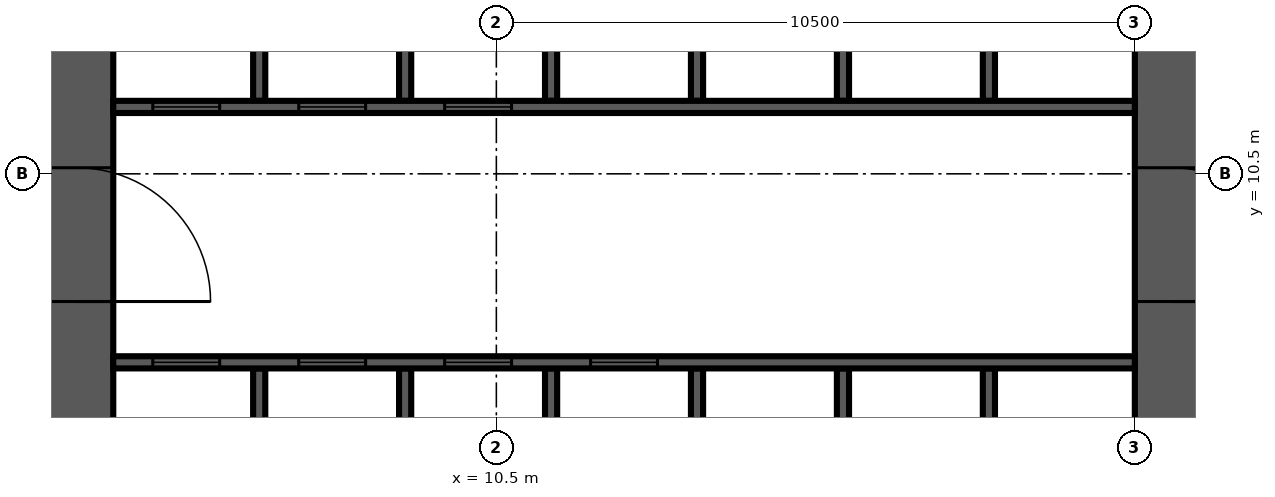
"""IFC4 building model, lengths in metres.
Left out: names, types, materials, properties, quantities, classifications, styles, units other than length and angle.
Written with IfcOpenShell. Run it as: python <this file> out.ifc"""

import sys

from ifc_helpers import new_model, si_unit, direction, frame, frame_2d, origin, place, context, subcontext, project, spatial, rectangle, extrude, source, transform, mapped, element, fill, save


model = new_model("IFC4")
c1 = context("Model", 3, precision=1e-05, world=origin(), true_north=direction((0.0, 1.0)))
c2 = subcontext(c1, "Body", "Model", "MODEL_VIEW")
j1 = project(units=[si_unit("LENGTHUNIT", "METRE"), si_unit("PLANEANGLEUNIT", "RADIAN")], contexts=[c1])
p1 = place(None, origin())
s1 = spatial("IfcSite", under=j1, at=p1, CompositionType="ELEMENT")
p2 = place(p1, origin())
s2 = spatial("IfcBuilding", under=s1, at=p2, CompositionType="ELEMENT")
p3 = place(p2, frame((0.0, 0.0, 90.9)))
s3 = spatial("IfcBuildingStorey", under=s2, at=p3, CompositionType="ELEMENT", Elevation=90.9)
m1 = source(origin(), c2, "Body", "SweptSolid", [
    extrude(rectangle(XDim=18.0, YDim=1.2, at=frame_2d((9.0, 0.0))), origin(), (0.0, 0.0, 1.0), 4.2),
])
p4 = place(p3, frame((3.6, 4.2, 0.0), z_axis=(0.0, 0.0, 1.0), x_axis=(0.0, 1.0, 0.0)))
e1 = element("IfcWall", 1, at=p4, inside=s3, PredefinedType="SHEAR", context=c2, shape_type="MappedRepresentation", body=[
    mapped(m1, transform((0.0, 0.0, 0.0), scale=1.0)),
])
m2 = source(origin(), c2, "Body", "SweptSolid", [
    extrude(rectangle(XDim=2.2, YDim=2.1, at=frame_2d((1.1, 1.05))), frame((0.0, 0.61, 0.0), z_axis=(0.0, -1.0, 0.0), x_axis=(1.0, 0.0, 0.0)), (0.0, 0.0, 1.0), 1.22),
])
p5 = place(p4, frame((4.2, 0.0, 0.0)))
e2 = element("IfcOpeningElement", 2, at=p5, cuts=e1, PredefinedType="OPENING", context=c2, shape_type="MappedRepresentation", body=[
    mapped(m2, transform((0.0, 0.0, 0.0), scale=1.0)),
])
m3 = source(origin(), c2, "Body", "SweptSolid", [
    extrude(rectangle(XDim=16.8, YDim=1.2, at=frame_2d((8.4, 0.0))), origin(), (0.0, 0.0, 1.0), 4.2),
])
p6 = place(p3, frame((21.6, 4.2, 0.0), z_axis=(0.0, 0.0, 1.0), x_axis=(0.0, 1.0, 0.0)))
e3 = element("IfcWall", 3, at=p6, inside=s3, PredefinedType="SHEAR", context=c2, shape_type="MappedRepresentation", body=[
    mapped(m3, transform((0.0, 0.0, 0.0), scale=1.0)),
])
p7 = place(p6, frame((4.2, 0.0, 0.0)))
e4 = element("IfcOpeningElement", 4, at=p7, cuts=e3, PredefinedType="OPENING", context=c2, shape_type="MappedRepresentation", body=[
    mapped(m2, transform((0.0, 0.0, 0.0), scale=1.0)),
])
m4 = source(origin(), c2, "Body", "SweptSolid", [
    extrude(rectangle(XDim=1.2, YDim=2.1, at=frame_2d((0.6, 1.05))), frame((0.0, 0.61, 0.0), z_axis=(0.0, -1.0, 0.0), x_axis=(1.0, 0.0, 0.0)), (0.0, 0.0, 1.0), 1.22),
])
p8 = place(p6, frame((14.7, 0.0, 0.0)))
e5 = element("IfcOpeningElement", 5, at=p8, cuts=e3, PredefinedType="OPENING", context=c2, shape_type="MappedRepresentation", body=[
    mapped(m4, transform((0.0, 0.0, 0.0), scale=1.0)),
])
m5 = source(origin(), c2, "Body", "SweptSolid", [
    extrude(rectangle(XDim=3.1, YDim=0.2, at=frame_2d((1.55, 0.0))), origin(), (0.0, 0.0, 1.0), 4.2),
])
for number, where, z_axis, x_axis in (
    (6, (6.6, 4.2, 0.0), (0.0, 0.0, 1.0), (0.0, 1.0, 0.0)),
    (7, (9.0, 4.2, 0.0), (0.0, 0.0, 1.0), (0.0, 1.0, 0.0)),
    (8, (11.4, 4.2, 0.0), (0.0, 0.0, 1.0), (0.0, 1.0, 0.0)),
    (9, (13.8, 4.2, 0.0), (0.0, 0.0, 1.0), (0.0, 1.0, 0.0)),
    (10, (16.2, 4.2, 0.0), (0.0, 0.0, 1.0), (0.0, 1.0, 0.0)),
    (11, (18.6, 4.2, 0.0), (0.0, 0.0, 1.0), (0.0, 1.0, 0.0)),
):
    element("IfcWall", number, at=place(p3, frame(where, z_axis=z_axis, x_axis=x_axis)), inside=s3, PredefinedType="SOLIDWALL", context=c2, shape_type="MappedRepresentation", body=[
        mapped(m5, transform((0.0, 0.0, 0.0), scale=1.0)),
    ])
m6 = source(origin(), c2, "Body", "SweptSolid", [
    extrude(rectangle(XDim=3.0, YDim=0.2, at=frame_2d((1.5, 0.0))), origin(), (0.0, 0.0, 1.0), 4.2),
])
for number, where, z_axis, x_axis in (
    (12, (6.6, 11.7, 0.0), (0.0, 0.0, 1.0), (0.0, 1.0, 0.0)),
    (13, (9.0, 11.7, 0.0), (0.0, 0.0, 1.0), (0.0, 1.0, 0.0)),
    (14, (11.4, 11.7, 0.0), (0.0, 0.0, 1.0), (0.0, 1.0, 0.0)),
    (15, (13.8, 11.7, 0.0), (0.0, 0.0, 1.0), (0.0, 1.0, 0.0)),
    (16, (16.2, 11.7, 0.0), (0.0, 0.0, 1.0), (0.0, 1.0, 0.0)),
    (17, (18.6, 11.7, 0.0), (0.0, 0.0, 1.0), (0.0, 1.0, 0.0)),
):
    element("IfcWall", number, at=place(p3, frame(where, z_axis=z_axis, x_axis=x_axis)), inside=s3, PredefinedType="SOLIDWALL", context=c2, shape_type="MappedRepresentation", body=[
        mapped(m6, transform((0.0, 0.0, 0.0), scale=1.0)),
    ])
m7 = source(origin(), c2, "Body", "SweptSolid", [
    extrude(rectangle(XDim=16.8, YDim=0.2, at=frame_2d((8.4, 0.0))), origin(), (0.0, 0.0, 1.0), 4.2),
])
p9 = place(p3, frame((4.2, 7.4, 0.0), z_axis=(0.0, 0.0, 1.0), x_axis=(1.0, 0.0, 0.0)))
e18 = element("IfcWall", 18, at=p9, inside=s3, PredefinedType="SOLIDWALL", context=c2, shape_type="MappedRepresentation", body=[
    mapped(m7, transform((0.0, 0.0, 0.0), scale=1.0)),
])
m8 = source(origin(), c2, "Body", "SweptSolid", [
    extrude(rectangle(XDim=1.1, YDim=2.1, at=frame_2d((0.55, 1.05))), frame((0.0, 0.11, 0.0), z_axis=(0.0, -1.0, 0.0), x_axis=(1.0, 0.0, 0.0)), (0.0, 0.0, 1.0), 0.22),
])
p10 = place(p9, frame((0.65, 0.0, 0.0)))
e19 = element("IfcOpeningElement", 19, at=p10, cuts=e18, PredefinedType="OPENING", context=c2, shape_type="MappedRepresentation", body=[
    mapped(m8, transform((0.0, 0.0, 0.0), scale=1.0)),
])
p11 = place(p9, frame((3.05, 0.0, 0.0)))
e20 = element("IfcOpeningElement", 20, at=p11, cuts=e18, PredefinedType="OPENING", context=c2, shape_type="MappedRepresentation", body=[
    mapped(m8, transform((0.0, 0.0, 0.0), scale=1.0)),
])
p12 = place(p9, frame((5.45, 0.0, 0.0)))
e21 = element("IfcOpeningElement", 21, at=p12, cuts=e18, PredefinedType="OPENING", context=c2, shape_type="MappedRepresentation", body=[
    mapped(m8, transform((0.0, 0.0, 0.0), scale=1.0)),
])
p13 = place(p9, frame((7.85, 0.0, 0.0)))
e22 = element("IfcOpeningElement", 22, at=p13, cuts=e18, PredefinedType="OPENING", context=c2, shape_type="MappedRepresentation", body=[
    mapped(m8, transform((0.0, 0.0, 0.0), scale=1.0)),
])
p14 = place(p3, frame((4.2, 11.6, 0.0), z_axis=(0.0, 0.0, 1.0), x_axis=(1.0, 0.0, 0.0)))
e23 = element("IfcWall", 23, at=p14, inside=s3, PredefinedType="SOLIDWALL", context=c2, shape_type="MappedRepresentation", body=[
    mapped(m7, transform((0.0, 0.0, 0.0), scale=1.0)),
])
p15 = place(p14, frame((0.65, 0.0, 0.0)))
e24 = element("IfcOpeningElement", 24, at=p15, cuts=e23, PredefinedType="OPENING", context=c2, shape_type="MappedRepresentation", body=[
    mapped(m8, transform((0.0, 0.0, 0.0), scale=1.0)),
])
p16 = place(p14, frame((3.05, 0.0, 0.0)))
e25 = element("IfcOpeningElement", 25, at=p16, cuts=e23, PredefinedType="OPENING", context=c2, shape_type="MappedRepresentation", body=[
    mapped(m8, transform((0.0, 0.0, 0.0), scale=1.0)),
])
p17 = place(p14, frame((5.45, 0.0, 0.0)))
e26 = element("IfcOpeningElement", 26, at=p17, cuts=e23, PredefinedType="OPENING", context=c2, shape_type="MappedRepresentation", body=[
    mapped(m8, transform((0.0, 0.0, 0.0), scale=1.0)),
])
m9 = source(origin(), c2, "Body", "SweptSolid", [
    extrude(rectangle(XDim=1.1, YDim=2.1, at=frame_2d((0.55, 1.05))), frame((0.0, 0.025, 0.0), z_axis=(0.0, -1.0, 0.0), x_axis=(1.0, 0.0, 0.0)), (0.0, 0.0, 1.0), 0.05),
])
p18 = place(p10, origin())
e27 = element("IfcDoor", 27, at=p18, inside=s3, OperationType="SLIDING_TO_LEFT", PredefinedType="DOOR", context=c2, shape_type="MappedRepresentation", body=[
    mapped(m9, transform((0.0, 0.0, 0.0), scale=1.0)),
])
fill(e19, e27)
p19 = place(p11, origin())
e28 = element("IfcDoor", 28, at=p19, inside=s3, OperationType="SLIDING_TO_LEFT", PredefinedType="DOOR", context=c2, shape_type="MappedRepresentation", body=[
    mapped(m9, transform((0.0, 0.0, 0.0), scale=1.0)),
])
fill(e20, e28)
p20 = place(p12, origin())
e29 = element("IfcDoor", 29, at=p20, inside=s3, OperationType="SLIDING_TO_LEFT", PredefinedType="DOOR", context=c2, shape_type="MappedRepresentation", body=[
    mapped(m9, transform((0.0, 0.0, 0.0), scale=1.0)),
])
fill(e21, e29)
p21 = place(p13, origin())
e30 = element("IfcDoor", 30, at=p21, inside=s3, OperationType="SLIDING_TO_LEFT", PredefinedType="DOOR", context=c2, shape_type="MappedRepresentation", body=[
    mapped(m9, transform((0.0, 0.0, 0.0), scale=1.0)),
])
fill(e22, e30)
p22 = place(p15, origin())
e31 = element("IfcDoor", 31, at=p22, inside=s3, OperationType="SLIDING_TO_LEFT", PredefinedType="DOOR", context=c2, shape_type="MappedRepresentation", body=[
    mapped(m9, transform((0.0, 0.0, 0.0), scale=1.0)),
])
fill(e24, e31)
p23 = place(p16, origin())
e32 = element("IfcDoor", 32, at=p23, inside=s3, OperationType="SLIDING_TO_LEFT", PredefinedType="DOOR", context=c2, shape_type="MappedRepresentation", body=[
    mapped(m9, transform((0.0, 0.0, 0.0), scale=1.0)),
])
fill(e25, e32)
p24 = place(p17, origin())
e33 = element("IfcDoor", 33, at=p24, inside=s3, OperationType="SLIDING_TO_LEFT", PredefinedType="DOOR", context=c2, shape_type="MappedRepresentation", body=[
    mapped(m9, transform((0.0, 0.0, 0.0), scale=1.0)),
])
fill(e26, e33)
m10 = source(origin(), c2, "Body", "SweptSolid", [
    extrude(rectangle(XDim=2.2, YDim=2.1, at=frame_2d((1.1, 1.05))), frame((0.0, 0.025, 0.0), z_axis=(0.0, -1.0, 0.0), x_axis=(1.0, 0.0, 0.0)), (0.0, 0.0, 1.0), 0.05),
])
p25 = place(p7, origin())
e34 = element("IfcDoor", 34, at=p25, inside=s3, OperationType="DOUBLE_DOOR_SINGLE_SWING", PredefinedType="DOOR", context=c2, shape_type="MappedRepresentation", body=[
    mapped(m10, transform((0.0, 0.0, 0.0), scale=1.0)),
])
fill(e4, e34)
p26 = place(p5, origin())
e35 = element("IfcDoor", 35, at=p26, inside=s3, OperationType="DOUBLE_DOOR_SINGLE_SWING", PredefinedType="DOOR", context=c2, shape_type="MappedRepresentation", body=[
    mapped(m10, transform((0.0, 0.0, 0.0), scale=1.0)),
])
fill(e2, e35)
save(model, sys.argv[1])
